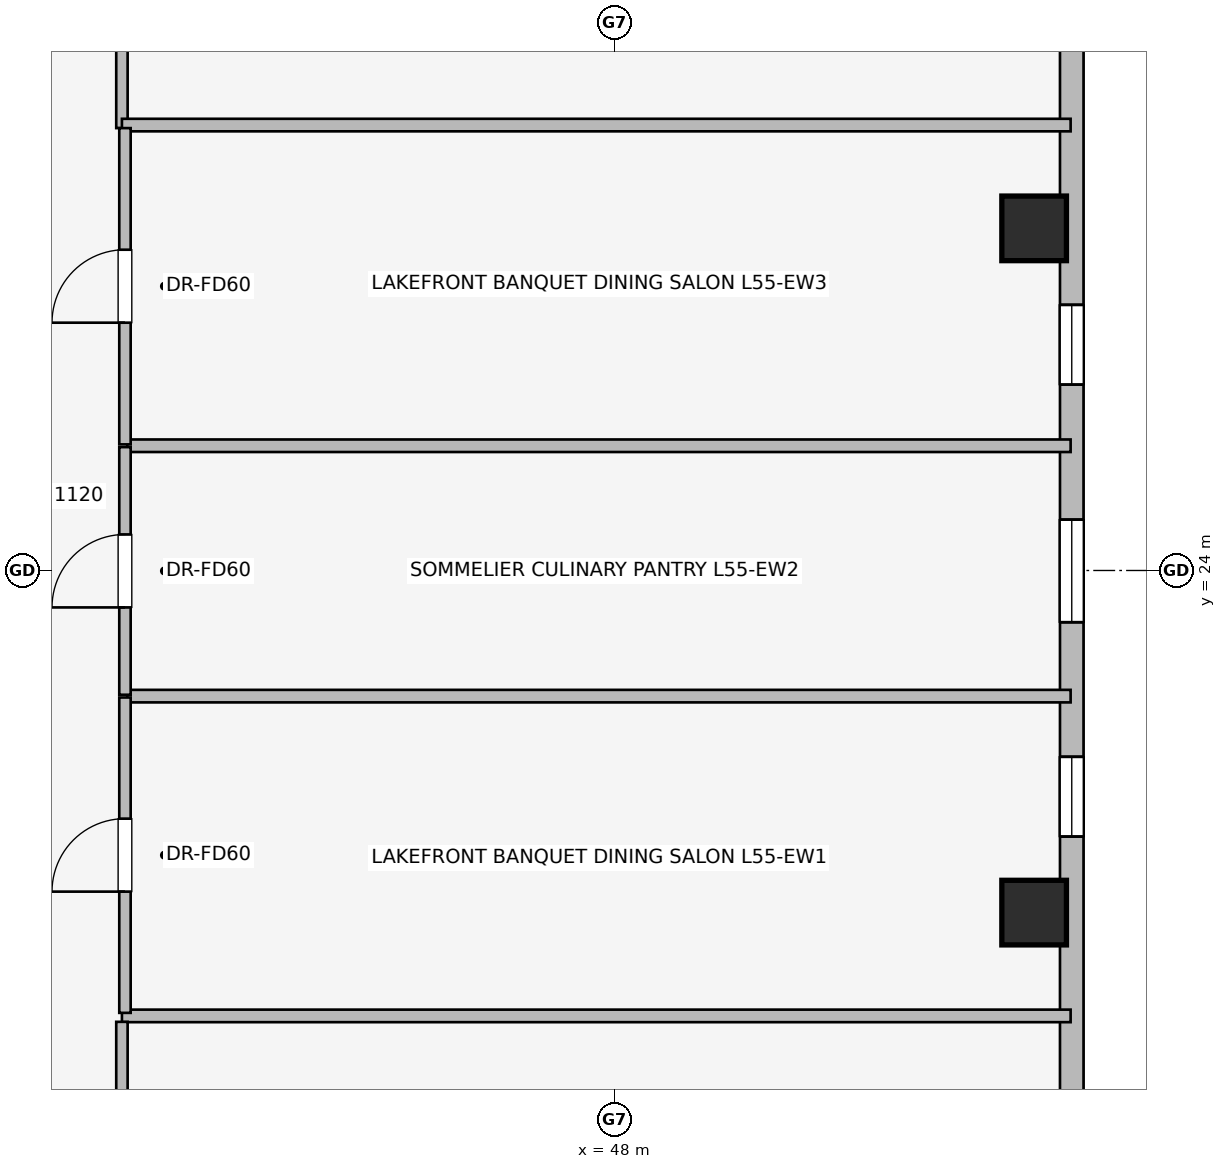
"""IFC4 building model, lengths in metres.
Left out: names, types, materials, properties, quantities, classifications, styles, units other than length and angle.
Written with IfcOpenShell. Run it as: python <this file> out.ifc"""

import sys

from ifc_helpers import new_model, si_unit, direction, frame, frame_2d, origin, origin_2d, place, context, subcontext, project, spatial, rectangle, extrude, element, fill, save


model = new_model("IFC4")
c1 = context("Model", 3, precision=1e-05, world=origin(), true_north=direction((0.0, 1.0)))
c2 = subcontext(c1, "Body", "Model", "MODEL_VIEW")
j1 = project(units=[si_unit("LENGTHUNIT", "METRE"), si_unit("PLANEANGLEUNIT", "RADIAN")], contexts=[c1])
p1 = place(None, origin())
s1 = spatial("IfcSite", under=j1, at=p1, CompositionType="ELEMENT")
p2 = place(p1, origin())
s2 = spatial("IfcBuilding", under=s1, at=p2, CompositionType="ELEMENT")
p3 = place(p2, frame((0.0, 0.0, 203.35)))
s3 = spatial("IfcBuildingStorey", under=s2, at=p3, CompositionType="ELEMENT", Elevation=203.35)
for number, where, z_axis, x_axis in (
    (1, (53.522, 19.499, 0.0), (0.0, 0.0, 1.0), (1.0, 0.0, 0.0)),
    (2, (53.522, 28.501, 0.0), (0.0, 0.0, 1.0), (1.0, 0.0, 0.0)),
):
    element("IfcColumn", number, at=place(p3, frame(where, z_axis=z_axis, x_axis=x_axis)), inside=s3, PredefinedType="COLUMN", context=c2, shape_type="SweptSolid", body=[
        extrude(rectangle(XDim=0.85, YDim=0.85, at=origin_2d()), origin(), (0.0, 0.0, 1.0), 3.45),
    ])
p4 = place(p3, frame((54.017, 31.502, 0.0), z_axis=(0.0, 0.0, 1.0), x_axis=(0.0, -1.0, 0.0)))
e3 = element("IfcWall", 3, at=p4, inside=s3, PredefinedType="STANDARD", context=c2, shape_type="SweptSolid", body=[
    extrude(rectangle(XDim=15.004, YDim=0.31, at=frame_2d((7.502, 0.0))), origin(), (0.0, 0.0, 1.0), 3.19),
])
p5 = place(p4, frame((4.007, 0.0, 0.75)))
e4 = element("IfcOpeningElement", 4, at=p5, cuts=e3, PredefinedType="OPENING", context=c2, shape_type="SweptSolid", body=[
    extrude(rectangle(XDim=1.05, YDim=1.4, at=frame_2d((0.525, 0.7))), frame((0.0, 0.165, 0.0), z_axis=(0.0, -1.0, 0.0), x_axis=(1.0, 0.0, 0.0)), (0.0, 0.0, 1.0), 0.33),
])
p6 = place(p4, frame((6.833, 0.0, 0.75)))
e5 = element("IfcOpeningElement", 5, at=p6, cuts=e3, PredefinedType="OPENING", context=c2, shape_type="SweptSolid", body=[
    extrude(rectangle(XDim=1.35, YDim=1.45, at=frame_2d((0.675, 0.725))), frame((0.0, 0.165, 0.0), z_axis=(0.0, -1.0, 0.0), x_axis=(1.0, 0.0, 0.0)), (0.0, 0.0, 1.0), 0.33),
])
p7 = place(p4, frame((9.953, 0.0, 0.75)))
e6 = element("IfcOpeningElement", 6, at=p7, cuts=e3, PredefinedType="OPENING", context=c2, shape_type="SweptSolid", body=[
    extrude(rectangle(XDim=1.05, YDim=1.4, at=frame_2d((0.525, 0.7))), frame((0.0, 0.165, 0.0), z_axis=(0.0, -1.0, 0.0), x_axis=(1.0, 0.0, 0.0)), (0.0, 0.0, 1.0), 0.33),
])
p8 = place(p3, frame((41.52, 29.82, 0.0), z_axis=(0.0, 0.0, 1.0), x_axis=(0.0, 1.0, 0.0)))
e7 = element("IfcWall", 7, at=p8, inside=s3, PredefinedType="PARTITIONING", context=c2, shape_type="SweptSolid", body=[
    extrude(rectangle(XDim=2.18, YDim=0.15, at=frame_2d((1.09, 0.0))), origin(), (0.0, 0.0, 1.0), 3.19),
])
for number, where, z_axis, x_axis in (
    (8, (41.52, 18.14, 0.0), (0.0, 0.0, 1.0), (1.0, 0.0, 0.0)),
    (9, (41.52, 29.86, 0.0), (0.0, 0.0, 1.0), (1.0, 0.0, 0.0)),
):
    element("IfcWall", number, at=place(p3, frame(where, z_axis=z_axis, x_axis=x_axis)), inside=s3, PredefinedType="PARTITIONING", context=c2, shape_type="SweptSolid", body=[
        extrude(rectangle(XDim=12.482, YDim=0.165, at=frame_2d((6.241, 0.0))), origin(), (0.0, 0.0, 1.0), 3.19),
    ])
for number, where, z_axis, x_axis in (
    (10, (41.59, 22.347, 0.0), (0.0, 0.0, 1.0), (1.0, 0.0, 0.0)),
    (11, (41.59, 25.641, 0.0), (0.0, 0.0, 1.0), (1.0, 0.0, 0.0)),
):
    element("IfcWall", number, at=place(p3, frame(where, z_axis=z_axis, x_axis=x_axis)), inside=s3, PredefinedType="PARTITIONING", context=c2, shape_type="SweptSolid", body=[
        extrude(rectangle(XDim=12.412, YDim=0.165, at=frame_2d((6.206, 0.0))), origin(), (0.0, 0.0, 1.0), 3.19),
    ])
p9 = place(p3, frame((41.56, 18.18, 0.0), z_axis=(0.0, 0.0, 1.0), x_axis=(0.0, 1.0, 0.0)))
e12 = element("IfcWall", 12, at=p9, inside=s3, PredefinedType="PARTITIONING", context=c2, shape_type="SweptSolid", body=[
    extrude(rectangle(XDim=4.149, YDim=0.15, at=frame_2d((2.075, 0.0))), origin(), (0.0, 0.0, 1.0), 3.19),
])
p10 = place(p9, frame((1.595, 0.0, 0.0)))
e13 = element("IfcOpeningElement", 13, at=p10, cuts=e12, PredefinedType="OPENING", context=c2, shape_type="SweptSolid", body=[
    extrude(rectangle(XDim=0.96, YDim=2.0, at=frame_2d((0.48, 1.0))), frame((0.0, 0.085, 0.0), z_axis=(0.0, -1.0, 0.0), x_axis=(1.0, 0.0, 0.0)), (0.0, 0.0, 1.0), 0.17),
])
p11 = place(p3, frame((41.56, 22.365, 0.0), z_axis=(0.0, 0.0, 1.0), x_axis=(0.0, 1.0, 0.0)))
e14 = element("IfcWall", 14, at=p11, inside=s3, PredefinedType="PARTITIONING", context=c2, shape_type="SweptSolid", body=[
    extrude(rectangle(XDim=3.258, YDim=0.15, at=frame_2d((1.629, 0.0))), origin(), (0.0, 0.0, 1.0), 3.19),
])
p12 = place(p11, frame((1.149, 0.0, 0.0)))
e15 = element("IfcOpeningElement", 15, at=p12, cuts=e14, PredefinedType="OPENING", context=c2, shape_type="SweptSolid", body=[
    extrude(rectangle(XDim=0.96, YDim=2.0, at=frame_2d((0.48, 1.0))), frame((0.0, 0.085, 0.0), z_axis=(0.0, -1.0, 0.0), x_axis=(1.0, 0.0, 0.0)), (0.0, 0.0, 1.0), 0.17),
])
p13 = place(p3, frame((41.56, 25.659, 0.0), z_axis=(0.0, 0.0, 1.0), x_axis=(0.0, 1.0, 0.0)))
e16 = element("IfcWall", 16, at=p13, inside=s3, PredefinedType="PARTITIONING", context=c2, shape_type="SweptSolid", body=[
    extrude(rectangle(XDim=4.161, YDim=0.15, at=frame_2d((2.081, 0.0))), origin(), (0.0, 0.0, 1.0), 3.19),
])
p14 = place(p13, frame((1.601, 0.0, 0.0)))
e17 = element("IfcOpeningElement", 17, at=p14, cuts=e16, PredefinedType="OPENING", context=c2, shape_type="SweptSolid", body=[
    extrude(rectangle(XDim=0.96, YDim=2.0, at=frame_2d((0.48, 1.0))), frame((0.0, 0.085, 0.0), z_axis=(0.0, -1.0, 0.0), x_axis=(1.0, 0.0, 0.0)), (0.0, 0.0, 1.0), 0.17),
])
p15 = place(p3, frame((41.52, 15.92, 0.0), z_axis=(0.0, 0.0, 1.0), x_axis=(0.0, 1.0, 0.0)))
e18 = element("IfcWall", 18, at=p15, inside=s3, PredefinedType="PARTITIONING", context=c2, shape_type="SweptSolid", body=[
    extrude(rectangle(XDim=2.142, YDim=0.15, at=frame_2d((1.071, 0.0))), origin(), (0.0, 0.0, 1.0), 3.19),
])
p16 = place(p5, origin())
e19 = element("IfcWindow", 19, at=p16, inside=s3, PartitioningType="SINGLE_PANEL", PredefinedType="WINDOW", context=c2, shape_type="SweptSolid", body=[
    extrude(rectangle(XDim=1.05, YDim=1.4, at=frame_2d((0.525, 0.7))), frame((0.0, 0.03, 0.0), z_axis=(0.0, -1.0, 0.0), x_axis=(1.0, 0.0, 0.0)), (0.0, 0.0, 1.0), 0.06),
])
fill(e4, e19)
p17 = place(p6, origin())
e20 = element("IfcWindow", 20, at=p17, inside=s3, PartitioningType="SINGLE_PANEL", PredefinedType="WINDOW", context=c2, shape_type="SweptSolid", body=[
    extrude(rectangle(XDim=1.35, YDim=1.45, at=frame_2d((0.675, 0.725))), frame((0.0, 0.03, 0.0), z_axis=(0.0, -1.0, 0.0), x_axis=(1.0, 0.0, 0.0)), (0.0, 0.0, 1.0), 0.06),
])
fill(e5, e20)
p18 = place(p7, origin())
e21 = element("IfcWindow", 21, at=p18, inside=s3, PartitioningType="SINGLE_PANEL", PredefinedType="WINDOW", context=c2, shape_type="SweptSolid", body=[
    extrude(rectangle(XDim=1.05, YDim=1.4, at=frame_2d((0.525, 0.7))), frame((0.0, 0.03, 0.0), z_axis=(0.0, -1.0, 0.0), x_axis=(1.0, 0.0, 0.0)), (0.0, 0.0, 1.0), 0.06),
])
fill(e6, e21)
p19 = place(p10, origin())
e22 = element("IfcDoor", 22, at=p19, inside=s3, OperationType="SINGLE_SWING_LEFT", PredefinedType="DOOR", context=c2, shape_type="SweptSolid", body=[
    extrude(rectangle(XDim=0.96, YDim=2.0, at=frame_2d((0.48, 1.0))), frame((0.0, 0.025, 0.0), z_axis=(0.0, -1.0, 0.0), x_axis=(1.0, 0.0, 0.0)), (0.0, 0.0, 1.0), 0.05),
])
fill(e13, e22)
p20 = place(p12, origin())
e23 = element("IfcDoor", 23, at=p20, inside=s3, OperationType="SINGLE_SWING_LEFT", PredefinedType="DOOR", context=c2, shape_type="SweptSolid", body=[
    extrude(rectangle(XDim=0.96, YDim=2.0, at=frame_2d((0.48, 1.0))), frame((0.0, 0.025, 0.0), z_axis=(0.0, -1.0, 0.0), x_axis=(1.0, 0.0, 0.0)), (0.0, 0.0, 1.0), 0.05),
])
fill(e15, e23)
p21 = place(p14, origin())
e24 = element("IfcDoor", 24, at=p21, inside=s3, OperationType="SINGLE_SWING_LEFT", PredefinedType="DOOR", context=c2, shape_type="SweptSolid", body=[
    extrude(rectangle(XDim=0.96, YDim=2.0, at=frame_2d((0.48, 1.0))), frame((0.0, 0.025, 0.0), z_axis=(0.0, -1.0, 0.0), x_axis=(1.0, 0.0, 0.0)), (0.0, 0.0, 1.0), 0.05),
])
fill(e17, e24)
save(model, sys.argv[1])
